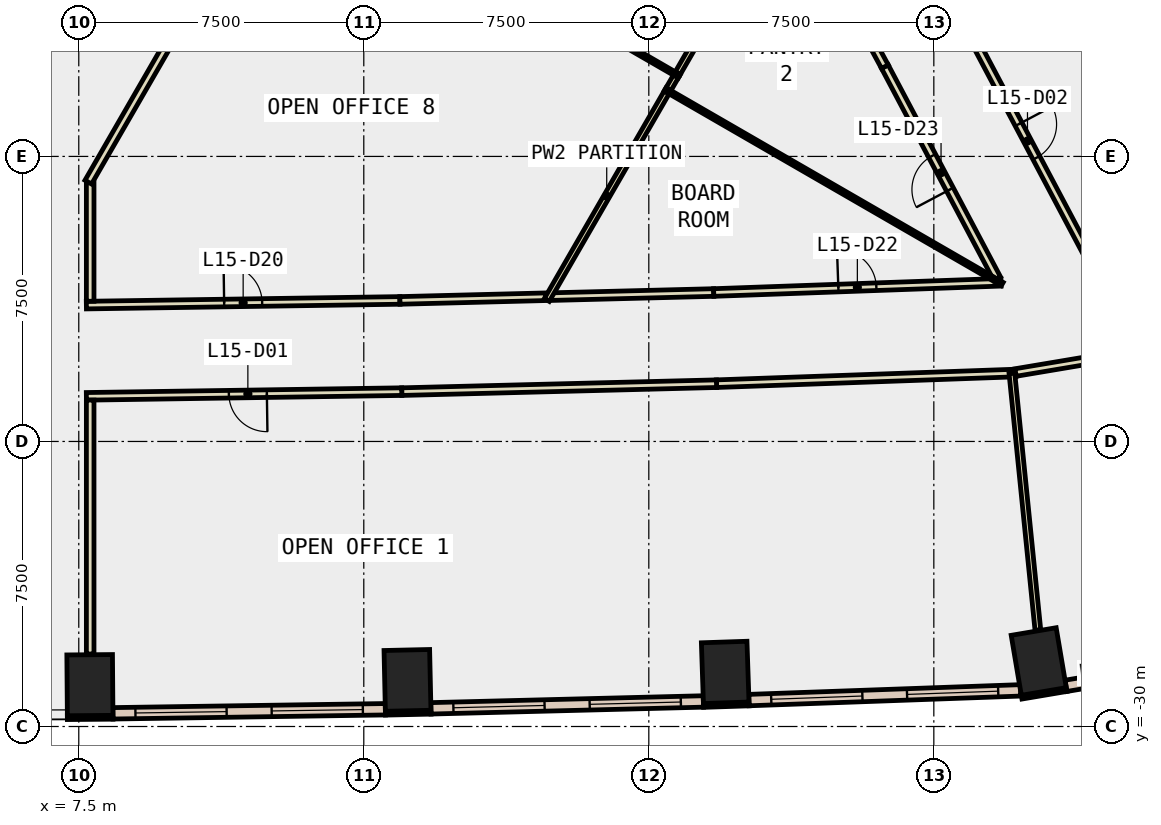
"""IFC4 building model, lengths in metres.
Left out: names, types, materials, properties, quantities, classifications, styles, units other than length and angle.
Written with IfcOpenShell. Run it as: python <this file> out.ifc"""

import sys

from ifc_helpers import new_model, si_unit, direction, frame, frame_2d, origin, origin_2d, place, context, subcontext, project, spatial, rectangle, extrude, element, fill, save


model = new_model("IFC4")
c1 = context("Model", 3, precision=1e-05, world=origin(), true_north=direction((0.0, 1.0)))
c2 = subcontext(c1, "Body", "Model", "MODEL_VIEW")
j1 = project(units=[si_unit("LENGTHUNIT", "METRE"), si_unit("PLANEANGLEUNIT", "RADIAN")], contexts=[c1])
p1 = place(None, origin())
s1 = spatial("IfcSite", under=j1, at=p1, CompositionType="ELEMENT")
p2 = place(p1, origin())
s2 = spatial("IfcBuilding", under=s1, at=p2, CompositionType="ELEMENT")
p3 = place(p2, frame((0.0, 0.0, 72.8)))
s3 = spatial("IfcBuildingStorey", under=s2, at=p3, CompositionType="ELEMENT", Elevation=72.8)
for number, where, z_axis, x_axis in (
    (1, (7.793, -28.912, -0.4), (0.0, 0.0, 1.0), (1.0, 0.008, 0.0)),
    (2, (16.15, -28.787, -0.4), (0.0, 0.0, 1.0), (1.0, 0.022, 0.0)),
    (3, (24.51, -28.577, -0.4), (0.0, 0.0, 1.0), (0.999, 0.034, 0.0)),
    (4, (32.761, -28.29, -0.4), (0.0, 0.0, 1.0), (0.986, 0.167, 0.0)),
):
    element("IfcColumn", number, at=place(p3, frame(where, z_axis=z_axis, x_axis=x_axis)), inside=s3, PredefinedType="COLUMN", context=c2, shape_type="SweptSolid", body=[
        extrude(rectangle(XDim=1.2, YDim=1.6, at=origin_2d()), origin(), (0.0, 0.0, 1.0), 4.2),
    ])
p4 = place(p3, frame((7.2, -29.767, 0.0), z_axis=(0.0, 0.0, 1.0), x_axis=(0.999965208912, 0.008341520563, 0.0)))
e5 = element("IfcWall", 5, at=p4, inside=s3, PredefinedType="STANDARD", context=c2, shape_type="SweptSolid", body=[
    extrude(rectangle(XDim=1.2, YDim=0.1, at=frame_2d((0.6, 0.0))), origin(), (0.0, 0.0, 1.0), 3.8),
])
p5 = place(p3, frame((15.569, -29.65, 0.0), z_axis=(0.0, 0.0, 1.0), x_axis=(0.99976752127, 0.021561618973, 0.0)))
e6 = element("IfcWall", 6, at=p5, inside=s3, PredefinedType="STANDARD", context=c2, shape_type="SweptSolid", body=[
    extrude(rectangle(XDim=1.2, YDim=0.1, at=frame_2d((0.6, 0.0))), origin(), (0.0, 0.0, 1.0), 3.8),
])
for number, where, z_axis, x_axis in (
    (7, (23.939, -29.446, 0.0), (0.0, 0.0, 1.0), (0.999, 0.033, 0.0)),
    (8, (32.311, -29.228, 0.0), (0.0, 0.0, 1.0), (0.986, 0.167, 0.0)),
):
    element("IfcWall", number, at=place(p3, frame(where, z_axis=z_axis, x_axis=x_axis)), inside=s3, PredefinedType="STANDARD", context=c2, shape_type="SweptSolid", body=[
        extrude(rectangle(XDim=1.2, YDim=0.1, at=frame_2d((0.6, 0.0))), origin(), (0.0, 0.0, 1.0), 3.8),
    ])
p6 = place(p3, frame((8.398, -29.653, 0.0), z_axis=(0.0, 0.0, 1.0), x_axis=(0.999888301342, 0.014946064363, 0.0)))
e9 = element("IfcWall", 9, at=p6, inside=s3, PredefinedType="STANDARD", context=c2, shape_type="SweptSolid", body=[
    extrude(rectangle(XDim=7.171, YDim=0.3, at=frame_2d((3.585, 0.0))), origin(), (0.0, 0.0, 1.0), 3.8),
])
p7 = place(p6, frame((0.593, 0.0, 0.9)))
e10 = element("IfcOpeningElement", 10, at=p7, cuts=e9, PredefinedType="OPENING", context=c2, shape_type="SweptSolid", body=[
    extrude(rectangle(XDim=2.4, YDim=2.6, at=frame_2d((1.2, 1.3))), frame((0.0, 0.16, 0.0), z_axis=(0.0, -1.0, 0.0), x_axis=(1.0, 0.0, 0.0)), (0.0, 0.0, 1.0), 0.32),
])
p8 = place(p6, frame((4.178, 0.0, 0.9)))
e11 = element("IfcOpeningElement", 11, at=p8, cuts=e9, PredefinedType="OPENING", context=c2, shape_type="SweptSolid", body=[
    extrude(rectangle(XDim=2.4, YDim=2.6, at=frame_2d((1.2, 1.3))), frame((0.0, 0.16, 0.0), z_axis=(0.0, -1.0, 0.0), x_axis=(1.0, 0.0, 0.0)), (0.0, 0.0, 1.0), 0.32),
])
p9 = place(p3, frame((16.765, -29.522, 0.0), z_axis=(0.0, 0.0, 1.0), x_axis=(0.999681944744, 0.025219225856, 0.0)))
e12 = element("IfcWall", 12, at=p9, inside=s3, PredefinedType="STANDARD", context=c2, shape_type="SweptSolid", body=[
    extrude(rectangle(XDim=7.173, YDim=0.3, at=frame_2d((3.587, 0.0))), origin(), (0.0, 0.0, 1.0), 3.8),
])
p10 = place(p9, frame((0.593, 0.0, 0.9)))
e13 = element("IfcOpeningElement", 13, at=p10, cuts=e12, PredefinedType="OPENING", context=c2, shape_type="SweptSolid", body=[
    extrude(rectangle(XDim=2.4, YDim=2.6, at=frame_2d((1.2, 1.3))), frame((0.0, 0.16, 0.0), z_axis=(0.0, -1.0, 0.0), x_axis=(1.0, 0.0, 0.0)), (0.0, 0.0, 1.0), 0.32),
])
p11 = place(p9, frame((4.18, 0.0, 0.9)))
e14 = element("IfcOpeningElement", 14, at=p11, cuts=e12, PredefinedType="OPENING", context=c2, shape_type="SweptSolid", body=[
    extrude(rectangle(XDim=2.4, YDim=2.6, at=frame_2d((1.2, 1.3))), frame((0.0, 0.16, 0.0), z_axis=(0.0, -1.0, 0.0), x_axis=(1.0, 0.0, 0.0)), (0.0, 0.0, 1.0), 0.32),
])
p12 = place(p3, frame((25.134, -29.305, 0.0), z_axis=(0.0, 0.0, 1.0), x_axis=(0.999359981296, 0.035771885388, 0.0)))
e15 = element("IfcWall", 15, at=p12, inside=s3, PredefinedType="STANDARD", context=c2, shape_type="SweptSolid", body=[
    extrude(rectangle(XDim=7.153, YDim=0.3, at=frame_2d((3.576, 0.0))), origin(), (0.0, 0.0, 1.0), 3.8),
])
p13 = place(p12, frame((0.588, 0.0, 0.9)))
e16 = element("IfcOpeningElement", 16, at=p13, cuts=e15, PredefinedType="OPENING", context=c2, shape_type="SweptSolid", body=[
    extrude(rectangle(XDim=2.4, YDim=2.6, at=frame_2d((1.2, 1.3))), frame((0.0, 0.16, 0.0), z_axis=(0.0, -1.0, 0.0), x_axis=(1.0, 0.0, 0.0)), (0.0, 0.0, 1.0), 0.32),
])
p14 = place(p12, frame((4.164, 0.0, 0.9)))
e17 = element("IfcOpeningElement", 17, at=p14, cuts=e15, PredefinedType="OPENING", context=c2, shape_type="SweptSolid", body=[
    extrude(rectangle(XDim=2.4, YDim=2.6, at=frame_2d((1.2, 1.3))), frame((0.0, 0.16, 0.0), z_axis=(0.0, -1.0, 0.0), x_axis=(1.0, 0.0, 0.0)), (0.0, 0.0, 1.0), 0.32),
])
p15 = place(p3, frame((33.477, -28.93, 0.0), z_axis=(0.0, 0.0, 1.0), x_axis=(0.986295041399, 0.164991185557, 0.0)))
e18 = element("IfcWall", 18, at=p15, inside=s3, PredefinedType="STANDARD", context=c2, shape_type="SweptSolid", body=[
    extrude(rectangle(XDim=4.145, YDim=0.3, at=frame_2d((2.072, 0.0))), origin(), (0.0, 0.0, 1.0), 3.8),
])
p16 = place(p15, frame((1.372, 0.0, 0.9)))
e19 = element("IfcOpeningElement", 19, at=p16, cuts=e18, PredefinedType="OPENING", context=c2, shape_type="SweptSolid", body=[
    extrude(rectangle(XDim=1.4, YDim=2.6, at=frame_2d((0.7, 1.3))), frame((0.0, 0.16, 0.0), z_axis=(0.0, -1.0, 0.0), x_axis=(1.0, 0.0, 0.0)), (0.0, 0.0, 1.0), 0.32),
])
p17 = place(p3, frame((7.7, -18.912, 0.0), z_axis=(0.0, 0.0, 1.0), x_axis=(0.999888819649, 0.014911349423, 0.0)))
e20 = element("IfcWall", 20, at=p17, inside=s3, PredefinedType="PARTITIONING", context=c2, shape_type="SweptSolid", body=[
    extrude(rectangle(XDim=8.252, YDim=0.2, at=frame_2d((4.126, 0.0))), origin(), (0.0, 0.0, 1.0), 3.8),
])
p18 = place(p17, frame((3.626, 0.0, 0.0)))
e21 = element("IfcOpeningElement", 21, at=p18, cuts=e20, PredefinedType="OPENING", context=c2, shape_type="SweptSolid", body=[
    extrude(rectangle(XDim=1.0, YDim=2.1, at=frame_2d((0.5, 1.05))), frame((0.0, 0.11, 0.0), z_axis=(0.0, -1.0, 0.0), x_axis=(1.0, 0.0, 0.0)), (0.0, 0.0, 1.0), 0.22),
])
p19 = place(p3, frame((15.951, -18.789, 0.0), z_axis=(0.0, 0.0, 1.0), x_axis=(0.999680018084, 0.025295482688, 0.0)))
e22 = element("IfcWall", 22, at=p19, inside=s3, PredefinedType="PARTITIONING", context=c2, shape_type="SweptSolid", body=[
    extrude(rectangle(XDim=3.841, YDim=0.2, at=frame_2d((1.921, 0.0))), origin(), (0.0, 0.0, 1.0), 3.8),
])
p20 = place(p3, frame((19.941, -18.689, 0.0), z_axis=(0.0, 0.0, 1.0), x_axis=(0.999680388185, 0.025280852018, 0.0)))
e23 = element("IfcWall", 23, at=p20, inside=s3, PredefinedType="PARTITIONING", context=c2, shape_type="SweptSolid", body=[
    extrude(rectangle(XDim=4.269, YDim=0.2, at=frame_2d((2.134, 0.0))), origin(), (0.0, 0.0, 1.0), 3.8),
])
p21 = place(p3, frame((24.208, -18.581, 0.0), z_axis=(0.0, 0.0, 1.0), x_axis=(0.99936260762, 0.035698438215, 0.0)))
e24 = element("IfcWall", 24, at=p21, inside=s3, PredefinedType="PARTITIONING", context=c2, shape_type="SweptSolid", body=[
    extrude(rectangle(XDim=7.564, YDim=0.2, at=frame_2d((3.782, 0.0))), origin(), (0.0, 0.0, 1.0), 3.8),
])
p22 = place(p21, frame((3.282, 0.0, 0.0)))
e25 = element("IfcOpeningElement", 25, at=p22, cuts=e24, PredefinedType="OPENING", context=c2, shape_type="SweptSolid", body=[
    extrude(rectangle(XDim=1.0, YDim=2.1, at=frame_2d((0.5, 1.05))), frame((0.0, 0.11, 0.0), z_axis=(0.0, -1.0, 0.0), x_axis=(1.0, 0.0, 0.0)), (0.0, 0.0, 1.0), 0.22),
])
p23 = place(p3, frame((31.668, -18.219, 0.0), z_axis=(0.0, 0.0, 1.0), x_axis=(-0.468058220157, 0.883697630722, 0.0)))
e26 = element("IfcWall", 26, at=p23, inside=s3, PredefinedType="PARTITIONING", context=c2, shape_type="SweptSolid", body=[
    extrude(rectangle(XDim=6.316, YDim=0.2, at=frame_2d((3.158, 0.0))), origin(), (0.0, 0.0, 1.0), 3.8),
])
p24 = place(p23, frame((2.658, 0.0, 0.0)))
e27 = element("IfcOpeningElement", 27, at=p24, cuts=e26, PredefinedType="OPENING", context=c2, shape_type="SweptSolid", body=[
    extrude(rectangle(XDim=1.0, YDim=2.1, at=frame_2d((0.5, 1.05))), frame((0.0, 0.11, 0.0), z_axis=(0.0, -1.0, 0.0), x_axis=(1.0, 0.0, 0.0)), (0.0, 0.0, 1.0), 0.22),
])
p25 = place(p3, frame((28.712, -12.638, 0.0), z_axis=(0.0, 0.0, 1.0), x_axis=(-0.476123321927, 0.8793785205, 0.0)))
e28 = element("IfcWall", 28, at=p25, inside=s3, PredefinedType="PARTITIONING", context=c2, shape_type="SweptSolid", body=[
    extrude(rectangle(XDim=5.364, YDim=0.2, at=frame_2d((2.682, 0.0))), origin(), (0.0, 0.0, 1.0), 3.8),
])
p26 = place(p3, frame((32.154, -20.699, 0.0), z_axis=(0.0, 0.0, 1.0), x_axis=(-0.999363643656, -0.035669423029, 0.0)))
e29 = element("IfcWall", 29, at=p26, inside=s3, PredefinedType="PARTITIONING", context=c2, shape_type="SweptSolid", body=[
    extrude(rectangle(XDim=7.878, YDim=0.2, at=frame_2d((3.939, 0.0))), origin(), (0.0, 0.0, 1.0), 3.8),
])
p27 = place(p3, frame((24.281, -20.98, 0.0), z_axis=(0.0, 0.0, 1.0), x_axis=(-0.999681784235, -0.025225587575, 0.0)))
e30 = element("IfcWall", 30, at=p27, inside=s3, PredefinedType="PARTITIONING", context=c2, shape_type="SweptSolid", body=[
    extrude(rectangle(XDim=8.285, YDim=0.2, at=frame_2d((4.142, 0.0))), origin(), (0.0, 0.0, 1.0), 3.8),
])
p28 = place(p3, frame((15.999, -21.189, 0.0), z_axis=(0.0, 0.0, 1.0), x_axis=(-0.999888353348, -0.014942584753, 0.0)))
e31 = element("IfcWall", 31, at=p28, inside=s3, PredefinedType="PARTITIONING", context=c2, shape_type="SweptSolid", body=[
    extrude(rectangle(XDim=8.3, YDim=0.2, at=frame_2d((4.15, 0.0))), origin(), (0.0, 0.0, 1.0), 3.8),
])
p29 = place(p28, frame((3.55, 0.0, 0.0)))
e32 = element("IfcOpeningElement", 32, at=p29, cuts=e31, PredefinedType="OPENING", context=c2, shape_type="SweptSolid", body=[
    extrude(rectangle(XDim=1.0, YDim=2.1, at=frame_2d((0.5, 1.05))), frame((0.0, 0.11, 0.0), z_axis=(0.0, -1.0, 0.0), x_axis=(1.0, 0.0, 0.0)), (0.0, 0.0, 1.0), 0.22),
])
p30 = place(p3, frame((30.793, -11.439, 0.0), z_axis=(0.0, 0.0, 1.0), x_axis=(0.468043291185, -0.883705537822, 0.0)))
e33 = element("IfcWall", 33, at=p30, inside=s3, PredefinedType="PARTITIONING", context=c2, shape_type="SweptSolid", body=[
    extrude(rectangle(XDim=7.066, YDim=0.2, at=frame_2d((3.533, 0.0))), origin(), (0.0, 0.0, 1.0), 3.8),
])
p31 = place(p30, frame((3.071, 0.0, 0.0)))
e34 = element("IfcOpeningElement", 34, at=p31, cuts=e33, PredefinedType="OPENING", context=c2, shape_type="SweptSolid", body=[
    extrude(rectangle(XDim=1.0, YDim=2.1, at=frame_2d((0.5, 1.05))), frame((0.0, 0.11, 0.0), z_axis=(0.0, -1.0, 0.0), x_axis=(1.0, 0.0, 0.0)), (0.0, 0.0, 1.0), 0.22),
])
p32 = place(p3, frame((34.518, -20.289, 0.0), z_axis=(0.0, 0.0, 1.0), x_axis=(-0.986214562432, -0.165471559025, 0.0)))
e35 = element("IfcWall", 35, at=p32, inside=s3, PredefinedType="PARTITIONING", context=c2, shape_type="SweptSolid", body=[
    extrude(rectangle(XDim=2.399, YDim=0.2, at=frame_2d((1.199, 0.0))), origin(), (0.0, 0.0, 1.0), 3.8),
])
p33 = place(p3, frame((7.8, -15.69, 0.0), z_axis=(0.0, 0.0, 1.0), x_axis=(0.0, -1.0, 0.0)))
e36 = element("IfcWall", 36, at=p33, inside=s3, PredefinedType="PARTITIONING", context=c2, shape_type="SweptSolid", body=[
    extrude(rectangle(XDim=3.121, YDim=0.2, at=frame_2d((1.561, 0.0))), origin(), (0.0, 0.0, 1.0), 3.8),
])
p34 = place(p3, frame((7.8, -21.411, 0.0), z_axis=(0.0, 0.0, 1.0), x_axis=(0.0, -1.0, 0.0)))
e37 = element("IfcWall", 37, at=p34, inside=s3, PredefinedType="PARTITIONING", context=c2, shape_type="SweptSolid", body=[
    extrude(rectangle(XDim=6.681, YDim=0.2, at=frame_2d((3.341, 0.0))), origin(), (0.0, 0.0, 1.0), 3.8),
])
p35 = place(p3, frame((12.4, -7.621, 0.0), z_axis=(0.0, 0.0, 1.0), x_axis=(-0.49990497871, -0.866080257402, 0.0)))
e38 = element("IfcWall", 38, at=p35, inside=s3, PredefinedType="PARTITIONING", context=c2, shape_type="SweptSolid", body=[
    extrude(rectangle(XDim=9.302, YDim=0.2, at=frame_2d((4.651, 0.0))), origin(), (0.0, 0.0, 1.0), 3.8),
])
p36 = place(p3, frame((12.843, -6.855, 0.0), z_axis=(0.0, 0.0, 1.0), x_axis=(0.866054959007, -0.499948805358, 0.0)))
e39 = element("IfcWall", 39, at=p36, inside=s3, PredefinedType="PARTITIONING", context=c2, shape_type="SweptSolid", body=[
    extrude(rectangle(XDim=12.075, YDim=0.1, at=frame_2d((6.038, 0.0))), origin(), (0.0, 0.0, 1.0), 3.8),
])
p37 = place(p3, frame((22.969, -13.316, 0.0), z_axis=(0.0, 0.0, 1.0), x_axis=(-0.500007312183, -0.866021182053, 0.0)))
e40 = element("IfcWall", 40, at=p37, inside=s3, PredefinedType="PARTITIONING", context=c2, shape_type="SweptSolid", body=[
    extrude(rectangle(XDim=6.306, YDim=0.15, at=frame_2d((3.153, 0.0))), origin(), (0.0, 0.0, 1.0), 3.8),
])
p38 = place(p3, frame((23.211, -12.898, 0.0), z_axis=(0.0, 0.0, 1.0), x_axis=(-0.501488909663, -0.865164073159, 0.0)))
e41 = element("IfcWall", 41, at=p38, inside=s3, PredefinedType="PARTITIONING", context=c2, shape_type="SweptSolid", body=[
    extrude(rectangle(XDim=0.383, YDim=0.15, at=frame_2d((0.191, 0.0))), origin(), (0.0, 0.0, 1.0), 3.8),
])
p39 = place(p3, frame((26.172, -7.768, 0.0), z_axis=(0.0, 0.0, 1.0), x_axis=(-0.499945058274, -0.866057122081, 0.0)))
e42 = element("IfcWall", 42, at=p39, inside=s3, PredefinedType="PARTITIONING", context=c2, shape_type="SweptSolid", body=[
    extrude(rectangle(XDim=5.823, YDim=0.15, at=frame_2d((2.912, 0.0))), origin(), (0.0, 0.0, 1.0), 3.8),
])
p40 = place(p3, frame((22.929, -13.235, 0.0), z_axis=(0.0, 0.0, 1.0), x_axis=(0.866003823807, -0.500037375755, 0.0)))
e43 = element("IfcWall", 43, at=p40, inside=s3, PredefinedType="PARTITIONING", context=c2, shape_type="SweptSolid", body=[
    extrude(rectangle(XDim=10.245, YDim=0.1, at=frame_2d((5.123, 0.0))), origin(), (0.0, 0.0, 1.0), 3.8),
])
p41 = place(p3, frame((32.054, -20.702, 0.0), z_axis=(0.0, 0.0, 1.0), x_axis=(0.100681219953, -0.994918736354, 0.0)))
e44 = element("IfcWall", 44, at=p41, inside=s3, PredefinedType="PARTITIONING", context=c2, shape_type="SweptSolid", body=[
    extrude(rectangle(XDim=6.794, YDim=0.15, at=frame_2d((3.397, 0.0))), origin(), (0.0, 0.0, 1.0), 3.8),
])
p42 = place(p7, origin())
e45 = element("IfcWindow", 45, at=p42, inside=s3, PartitioningType="SINGLE_PANEL", PredefinedType="WINDOW", context=c2, shape_type="SweptSolid", body=[
    extrude(rectangle(XDim=2.4, YDim=2.6, at=frame_2d((1.2, 1.3))), frame((0.0, 0.03, 0.0), z_axis=(0.0, -1.0, 0.0), x_axis=(1.0, 0.0, 0.0)), (0.0, 0.0, 1.0), 0.06),
])
fill(e10, e45)
p43 = place(p8, origin())
e46 = element("IfcWindow", 46, at=p43, inside=s3, PartitioningType="SINGLE_PANEL", PredefinedType="WINDOW", context=c2, shape_type="SweptSolid", body=[
    extrude(rectangle(XDim=2.4, YDim=2.6, at=frame_2d((1.2, 1.3))), frame((0.0, 0.03, 0.0), z_axis=(0.0, -1.0, 0.0), x_axis=(1.0, 0.0, 0.0)), (0.0, 0.0, 1.0), 0.06),
])
fill(e11, e46)
p44 = place(p10, origin())
e47 = element("IfcWindow", 47, at=p44, inside=s3, PartitioningType="SINGLE_PANEL", PredefinedType="WINDOW", context=c2, shape_type="SweptSolid", body=[
    extrude(rectangle(XDim=2.4, YDim=2.6, at=frame_2d((1.2, 1.3))), frame((0.0, 0.03, 0.0), z_axis=(0.0, -1.0, 0.0), x_axis=(1.0, 0.0, 0.0)), (0.0, 0.0, 1.0), 0.06),
])
fill(e13, e47)
p45 = place(p11, origin())
e48 = element("IfcWindow", 48, at=p45, inside=s3, PartitioningType="SINGLE_PANEL", PredefinedType="WINDOW", context=c2, shape_type="SweptSolid", body=[
    extrude(rectangle(XDim=2.4, YDim=2.6, at=frame_2d((1.2, 1.3))), frame((0.0, 0.03, 0.0), z_axis=(0.0, -1.0, 0.0), x_axis=(1.0, 0.0, 0.0)), (0.0, 0.0, 1.0), 0.06),
])
fill(e14, e48)
p46 = place(p13, origin())
e49 = element("IfcWindow", 49, at=p46, inside=s3, PartitioningType="SINGLE_PANEL", PredefinedType="WINDOW", context=c2, shape_type="SweptSolid", body=[
    extrude(rectangle(XDim=2.4, YDim=2.6, at=frame_2d((1.2, 1.3))), frame((0.0, 0.03, 0.0), z_axis=(0.0, -1.0, 0.0), x_axis=(1.0, 0.0, 0.0)), (0.0, 0.0, 1.0), 0.06),
])
fill(e16, e49)
p47 = place(p14, origin())
e50 = element("IfcWindow", 50, at=p47, inside=s3, PartitioningType="SINGLE_PANEL", PredefinedType="WINDOW", context=c2, shape_type="SweptSolid", body=[
    extrude(rectangle(XDim=2.4, YDim=2.6, at=frame_2d((1.2, 1.3))), frame((0.0, 0.03, 0.0), z_axis=(0.0, -1.0, 0.0), x_axis=(1.0, 0.0, 0.0)), (0.0, 0.0, 1.0), 0.06),
])
fill(e17, e50)
p48 = place(p29, origin())
e51 = element("IfcDoor", 51, at=p48, inside=s3, OperationType="SINGLE_SWING_LEFT", PredefinedType="DOOR", context=c2, shape_type="SweptSolid", body=[
    extrude(rectangle(XDim=1.0, YDim=2.1, at=frame_2d((0.5, 1.05))), frame((0.0, 0.025, 0.0), z_axis=(0.0, -1.0, 0.0), x_axis=(1.0, 0.0, 0.0)), (0.0, 0.0, 1.0), 0.05),
])
fill(e32, e51)
p49 = place(p31, origin())
e52 = element("IfcDoor", 52, at=p49, inside=s3, OperationType="SINGLE_SWING_RIGHT", PredefinedType="DOOR", context=c2, shape_type="SweptSolid", body=[
    extrude(rectangle(XDim=1.0, YDim=2.1, at=frame_2d((0.5, 1.05))), frame((0.0, 0.025, 0.0), z_axis=(0.0, -1.0, 0.0), x_axis=(1.0, 0.0, 0.0)), (0.0, 0.0, 1.0), 0.05),
])
fill(e34, e52)
p50 = place(p18, origin())
e53 = element("IfcDoor", 53, at=p50, inside=s3, OperationType="SINGLE_SWING_RIGHT", PredefinedType="DOOR", context=c2, shape_type="SweptSolid", body=[
    extrude(rectangle(XDim=1.0, YDim=2.1, at=frame_2d((0.5, 1.05))), frame((0.0, 0.025, 0.0), z_axis=(0.0, -1.0, 0.0), x_axis=(1.0, 0.0, 0.0)), (0.0, 0.0, 1.0), 0.05),
])
fill(e21, e53)
p51 = place(p22, origin())
e54 = element("IfcDoor", 54, at=p51, inside=s3, OperationType="SINGLE_SWING_LEFT", PredefinedType="DOOR", context=c2, shape_type="SweptSolid", body=[
    extrude(rectangle(XDim=1.0, YDim=2.1, at=frame_2d((0.5, 1.05))), frame((0.0, 0.025, 0.0), z_axis=(0.0, -1.0, 0.0), x_axis=(1.0, 0.0, 0.0)), (0.0, 0.0, 1.0), 0.05),
])
fill(e25, e54)
p52 = place(p24, origin())
e55 = element("IfcDoor", 55, at=p52, inside=s3, OperationType="SINGLE_SWING_LEFT", PredefinedType="DOOR", context=c2, shape_type="SweptSolid", body=[
    extrude(rectangle(XDim=1.0, YDim=2.1, at=frame_2d((0.5, 1.05))), frame((0.0, 0.025, 0.0), z_axis=(0.0, -1.0, 0.0), x_axis=(1.0, 0.0, 0.0)), (0.0, 0.0, 1.0), 0.05),
])
fill(e27, e55)
save(model, sys.argv[1])
